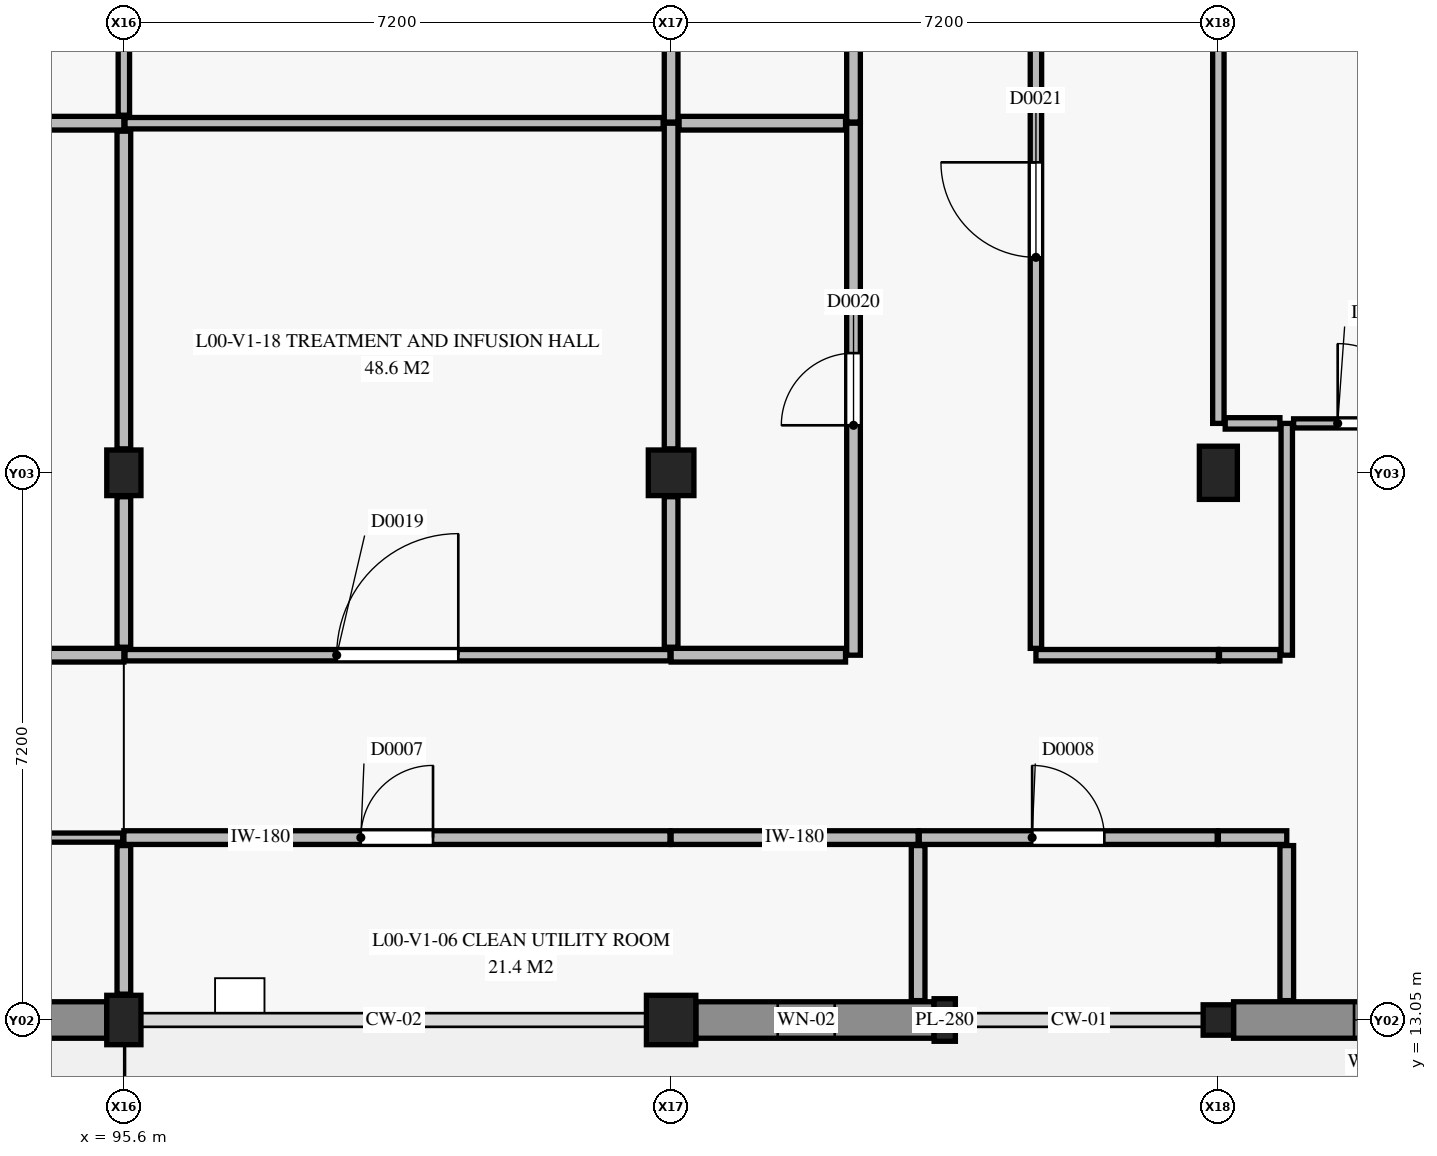
"""IFC4 building model, lengths in metres.
Left out: names, types, materials, properties, quantities, classifications, styles, units other than length and angle.
Written with IfcOpenShell. Run it as: python <this file> out.ifc"""

import sys

from ifc_helpers import new_model, si_unit, direction, frame, frame_2d, origin, origin_2d, place, context, subcontext, project, spatial, rectangle, extrude, element, fill, save


model = new_model("IFC4")
c1 = context("Model", 3, precision=1e-05, world=origin(), true_north=direction((0.0, 1.0)))
c2 = subcontext(c1, "Body", "Model", "MODEL_VIEW")
j1 = project(units=[si_unit("LENGTHUNIT", "METRE"), si_unit("PLANEANGLEUNIT", "RADIAN")], contexts=[c1])
p1 = place(None, origin())
s1 = spatial("IfcSite", under=j1, at=p1, CompositionType="ELEMENT")
p2 = place(p1, origin())
s2 = spatial("IfcBuilding", under=s1, at=p2, CompositionType="ELEMENT")
p3 = place(p2, origin())
s3 = spatial("IfcBuildingStorey", under=s2, at=p3, CompositionType="ELEMENT", Elevation=0.0)
p4 = place(p3, frame((95.6, 13.05, 0.0), z_axis=(0.0, 0.0, 1.0), x_axis=(1.0, 0.0, 0.0)))
e1 = element("IfcColumn", 1, at=p4, inside=s3, PredefinedType="COLUMN", context=c2, shape_type="SweptSolid", body=[
    extrude(rectangle(XDim=0.45, YDim=0.65, at=origin_2d()), origin(), (0.0, 0.0, 1.0), 4.8),
])
p5 = place(p3, frame((95.6, 20.25, 0.0), z_axis=(0.0, 0.0, 1.0), x_axis=(1.0, 0.0, 0.0)))
e2 = element("IfcColumn", 2, at=p5, inside=s3, PredefinedType="COLUMN", context=c2, shape_type="SweptSolid", body=[
    extrude(rectangle(XDim=0.45, YDim=0.6, at=origin_2d()), origin(), (0.0, 0.0, 1.0), 4.8),
])
p6 = place(p3, frame((102.8, 13.05, 0.0), z_axis=(0.0, 0.0, 1.0), x_axis=(1.0, 0.0, 0.0)))
e3 = element("IfcColumn", 3, at=p6, inside=s3, PredefinedType="COLUMN", context=c2, shape_type="SweptSolid", body=[
    extrude(rectangle(XDim=0.65, YDim=0.65, at=origin_2d()), origin(), (0.0, 0.0, 1.0), 4.8),
])
p7 = place(p3, frame((102.8, 20.25, 0.0), z_axis=(0.0, 0.0, 1.0), x_axis=(1.0, 0.0, 0.0)))
e4 = element("IfcColumn", 4, at=p7, inside=s3, PredefinedType="COLUMN", context=c2, shape_type="SweptSolid", body=[
    extrude(rectangle(XDim=0.6, YDim=0.6, at=origin_2d()), origin(), (0.0, 0.0, 1.0), 4.8),
])
p8 = place(p3, frame((110.0, 13.05, 0.0), z_axis=(0.0, 0.0, 1.0), x_axis=(1.0, 0.0, 0.0)))
e5 = element("IfcColumn", 5, at=p8, inside=s3, PredefinedType="COLUMN", context=c2, shape_type="SweptSolid", body=[
    extrude(rectangle(XDim=0.4, YDim=0.4, at=origin_2d()), origin(), (0.0, 0.0, 1.0), 4.8),
])
p9 = place(p3, frame((110.0, 20.25, 0.0), z_axis=(0.0, 0.0, 1.0), x_axis=(1.0, 0.0, 0.0)))
e6 = element("IfcColumn", 6, at=p9, inside=s3, PredefinedType="COLUMN", context=c2, shape_type="SweptSolid", body=[
    extrude(rectangle(XDim=0.5, YDim=0.7, at=origin_2d()), origin(), (0.0, 0.0, 1.0), 4.8),
])
p10 = place(p3, frame((106.4, 13.05, 0.0), z_axis=(0.0, 0.0, 1.0), x_axis=(1.0, 0.0, 0.0)))
e7 = element("IfcColumn", 7, at=p10, inside=s3, PredefinedType="PILASTER", context=c2, shape_type="SweptSolid", body=[
    extrude(rectangle(XDim=0.28, YDim=0.56, at=origin_2d()), origin(), (0.0, 0.0, 1.0), 4.8),
])
p11 = place(p3, frame((113.25, 13.05, 0.0), z_axis=(0.0, 0.0, 1.0), x_axis=(-1.0, 0.0, 0.0)))
e8 = element("IfcWall", 8, at=p11, inside=s3, PredefinedType="SOLIDWALL", context=c2, shape_type="SweptSolid", body=[
    extrude(rectangle(XDim=3.05, YDim=0.48, at=frame_2d((1.525, 0.0))), origin(), (0.0, 0.0, 1.0), 3.73),
])
p12 = place(p11, frame((0.865, 0.0, 0.9)))
e9 = element("IfcOpeningElement", 9, at=p12, cuts=e8, PredefinedType="OPENING", context=c2, shape_type="SweptSolid", body=[
    extrude(rectangle(XDim=0.6, YDim=1.8, at=frame_2d((0.3, 0.9))), frame((0.0, 0.25, 0.0), z_axis=(0.0, -1.0, 0.0), x_axis=(1.0, 0.0, 0.0)), (0.0, 0.0, 1.0), 0.5),
])
p13 = place(p3, frame((106.26, 13.05, 0.0), z_axis=(0.0, 0.0, 1.0), x_axis=(-1.0, 0.0, 0.0)))
e10 = element("IfcWall", 10, at=p13, inside=s3, PredefinedType="SOLIDWALL", context=c2, shape_type="SweptSolid", body=[
    extrude(rectangle(XDim=3.135, YDim=0.48, at=frame_2d((1.567, 0.0))), origin(), (0.0, 0.0, 1.0), 3.73),
])
p14 = place(p13, frame((1.308, 0.0, 0.9)))
e11 = element("IfcOpeningElement", 11, at=p14, cuts=e10, PredefinedType="OPENING", context=c2, shape_type="SweptSolid", body=[
    extrude(rectangle(XDim=0.75, YDim=1.8, at=frame_2d((0.375, 0.9))), frame((0.0, 0.25, 0.0), z_axis=(0.0, -1.0, 0.0), x_axis=(1.0, 0.0, 0.0)), (0.0, 0.0, 1.0), 0.5),
])
p15 = place(p3, frame((95.375, 13.05, 0.0), z_axis=(0.0, 0.0, 1.0), x_axis=(-1.0, 0.0, 0.0)))
e12 = element("IfcWall", 12, at=p15, inside=s3, PredefinedType="SOLIDWALL", context=c2, shape_type="SweptSolid", body=[
    extrude(rectangle(XDim=3.225, YDim=0.48, at=frame_2d((1.613, 0.0))), origin(), (0.0, 0.0, 1.0), 3.73),
])
p16 = place(p15, frame((0.978, 0.0, 0.9)))
e13 = element("IfcOpeningElement", 13, at=p16, cuts=e12, PredefinedType="OPENING", context=c2, shape_type="SweptSolid", body=[
    extrude(rectangle(XDim=0.9, YDim=1.8, at=frame_2d((0.45, 0.9))), frame((0.0, 0.25, 0.0), z_axis=(0.0, -1.0, 0.0), x_axis=(1.0, 0.0, 0.0)), (0.0, 0.0, 1.0), 0.5),
])
p17 = place(p3, frame((102.8, 15.45, 0.0), z_axis=(0.0, 0.0, 1.0), x_axis=(1.0, 0.0, 0.0)))
e14 = element("IfcWall", 14, at=p17, inside=s3, PredefinedType="PLUMBINGWALL", context=c2, shape_type="SweptSolid", body=[
    extrude(rectangle(XDim=3.25, YDim=0.18, at=frame_2d((1.625, 0.0))), origin(), (0.0, 0.0, 1.0), 3.735),
])
p18 = place(p3, frame((95.6, 15.45, 0.0), z_axis=(0.0, 0.0, 1.0), x_axis=(1.0, 0.0, 0.0)))
e15 = element("IfcWall", 15, at=p18, inside=s3, PredefinedType="PLUMBINGWALL", context=c2, shape_type="SweptSolid", body=[
    extrude(rectangle(XDim=7.185, YDim=0.18, at=frame_2d((3.592, 0.0))), origin(), (0.0, 0.0, 1.0), 3.735),
])
p19 = place(p18, frame((3.117, 0.0, 0.0)))
e16 = element("IfcOpeningElement", 16, at=p19, cuts=e15, PredefinedType="OPENING", context=c2, shape_type="SweptSolid", body=[
    extrude(rectangle(XDim=0.95, YDim=2.1, at=frame_2d((0.475, 1.05))), frame((0.0, 0.1, 0.0), z_axis=(0.0, -1.0, 0.0), x_axis=(1.0, 0.0, 0.0)), (0.0, 0.0, 1.0), 0.2),
])
p20 = place(p3, frame((110.0, 15.45, 0.0), z_axis=(0.0, 0.0, 1.0), x_axis=(1.0, 0.0, 0.0)))
e17 = element("IfcWall", 17, at=p20, inside=s3, PredefinedType="PLUMBINGWALL", context=c2, shape_type="SweptSolid", body=[
    extrude(rectangle(XDim=0.9, YDim=0.18, at=frame_2d((0.45, 0.0))), origin(), (0.0, 0.0, 1.0), 3.955),
])
p21 = place(p3, frame((110.9, 13.305, 0.0), z_axis=(0.0, 0.0, 1.0), x_axis=(0.0, 1.0, 0.0)))
e18 = element("IfcWall", 18, at=p21, inside=s3, PredefinedType="PLUMBINGWALL", context=c2, shape_type="SweptSolid", body=[
    extrude(rectangle(XDim=2.04, YDim=0.18, at=frame_2d((1.02, 0.0))), origin(), (0.0, 0.0, 1.0), 4.55),
])
p22 = place(p3, frame((106.065, 15.45, 0.0), z_axis=(0.0, 0.0, 1.0), x_axis=(1.0, 0.0, 0.0)))
e19 = element("IfcWall", 19, at=p22, inside=s3, PredefinedType="PLUMBINGWALL", context=c2, shape_type="SweptSolid", body=[
    extrude(rectangle(XDim=3.92, YDim=0.18, at=frame_2d((1.96, 0.0))), origin(), (0.0, 0.0, 1.0), 3.955),
])
p23 = place(p22, frame((1.485, 0.0, 0.0)))
e20 = element("IfcOpeningElement", 20, at=p23, cuts=e19, PredefinedType="OPENING", context=c2, shape_type="SweptSolid", body=[
    extrude(rectangle(XDim=0.95, YDim=2.1, at=frame_2d((0.475, 1.05))), frame((0.0, 0.1, 0.0), z_axis=(0.0, -1.0, 0.0), x_axis=(1.0, 0.0, 0.0)), (0.0, 0.0, 1.0), 0.2),
])
p24 = place(p3, frame((92.5, 17.85, 0.0), z_axis=(0.0, 0.0, 1.0), x_axis=(1.0, 0.0, 0.0)))
e21 = element("IfcWall", 21, at=p24, inside=s3, PredefinedType="PLUMBINGWALL", context=c2, shape_type="SweptSolid", body=[
    extrude(rectangle(XDim=3.1, YDim=0.18, at=frame_2d((1.55, 0.0))), origin(), (0.0, 0.0, 1.0), 3.985),
])
p25 = place(p24, frame((1.075, 0.0, 0.0)))
e22 = element("IfcOpeningElement", 22, at=p25, cuts=e21, PredefinedType="OPENING", context=c2, shape_type="SweptSolid", body=[
    extrude(rectangle(XDim=0.95, YDim=2.1, at=frame_2d((0.475, 1.05))), frame((0.0, 0.1, 0.0), z_axis=(0.0, -1.0, 0.0), x_axis=(1.0, 0.0, 0.0)), (0.0, 0.0, 1.0), 0.2),
])
p26 = place(p3, frame((105.2, 17.85, 0.0), z_axis=(0.0, 0.0, 1.0), x_axis=(0.0, 1.0, 0.0)))
e23 = element("IfcWall", 23, at=p26, inside=s3, PredefinedType="PLUMBINGWALL", context=c2, shape_type="SweptSolid", body=[
    extrude(rectangle(XDim=7.0, YDim=0.18, at=frame_2d((3.5, 0.0))), origin(), (0.0, 0.0, 1.0), 3.955),
])
p27 = place(p26, frame((3.025, 0.0, 0.0)))
e24 = element("IfcOpeningElement", 24, at=p27, cuts=e23, PredefinedType="OPENING", context=c2, shape_type="SweptSolid", body=[
    extrude(rectangle(XDim=0.95, YDim=2.1, at=frame_2d((0.475, 1.05))), frame((0.0, 0.1, 0.0), z_axis=(0.0, -1.0, 0.0), x_axis=(1.0, 0.0, 0.0)), (0.0, 0.0, 1.0), 0.2),
])
p28 = place(p3, frame((102.8, 17.85, 0.0), z_axis=(0.0, 0.0, 1.0), x_axis=(1.0, 0.0, 0.0)))
e25 = element("IfcWall", 25, at=p28, inside=s3, PredefinedType="PLUMBINGWALL", context=c2, shape_type="SweptSolid", body=[
    extrude(rectangle(XDim=2.295, YDim=0.18, at=frame_2d((1.147, 0.0))), origin(), (0.0, 0.0, 1.0), 3.735),
])
p29 = place(p3, frame((105.2, 24.865, 0.0), z_axis=(0.0, 0.0, 1.0), x_axis=(0.0, 1.0, 0.0)))
e26 = element("IfcWall", 26, at=p29, inside=s3, PredefinedType="PLUMBINGWALL", context=c2, shape_type="SweptSolid", body=[
    extrude(rectangle(XDim=7.58, YDim=0.18, at=frame_2d((3.79, 0.0))), origin(), (0.0, 0.0, 1.0), 3.955),
])
p30 = place(p29, frame((3.315, 0.0, 0.0)))
e27 = element("IfcOpeningElement", 27, at=p30, cuts=e26, PredefinedType="OPENING", context=c2, shape_type="SweptSolid", body=[
    extrude(rectangle(XDim=0.95, YDim=2.1, at=frame_2d((0.475, 1.05))), frame((0.0, 0.1, 0.0), z_axis=(0.0, -1.0, 0.0), x_axis=(1.0, 0.0, 0.0)), (0.0, 0.0, 1.0), 0.2),
])
p31 = place(p3, frame((95.615, 17.85, 0.0), z_axis=(0.0, 0.0, 1.0), x_axis=(1.0, 0.0, 0.0)))
e28 = element("IfcWall", 28, at=p31, inside=s3, PredefinedType="PARTITIONING", context=c2, shape_type="SweptSolid", body=[
    extrude(rectangle(XDim=7.17, YDim=0.15, at=frame_2d((3.585, 0.0))), origin(), (0.0, 0.0, 1.0), 3.735),
])
p32 = place(p31, frame((2.785, 0.0, 0.0)))
e29 = element("IfcOpeningElement", 29, at=p32, cuts=e28, PredefinedType="OPENING", context=c2, shape_type="SweptSolid", body=[
    extrude(rectangle(XDim=1.6, YDim=2.25, at=frame_2d((0.8, 1.125))), frame((0.0, 0.085, 0.0), z_axis=(0.0, -1.0, 0.0), x_axis=(1.0, 0.0, 0.0)), (0.0, 0.0, 1.0), 0.17),
])
p33 = place(p3, frame((107.6, 17.85, 0.0), z_axis=(0.0, 0.0, 1.0), x_axis=(1.0, 0.0, 0.0)))
e30 = element("IfcWall", 30, at=p33, inside=s3, PredefinedType="PARTITIONING", context=c2, shape_type="SweptSolid", body=[
    extrude(rectangle(XDim=2.4, YDim=0.15, at=frame_2d((1.2, 0.0))), origin(), (0.0, 0.0, 1.0), 3.955),
])
p34 = place(p3, frame((107.6, 17.94, 0.0), z_axis=(0.0, 0.0, 1.0), x_axis=(0.0, 1.0, 0.0)))
e31 = element("IfcWall", 31, at=p34, inside=s3, PredefinedType="PARTITIONING", context=c2, shape_type="SweptSolid", body=[
    extrude(rectangle(XDim=11.54, YDim=0.15, at=frame_2d((5.77, 0.0))), origin(), (0.0, 0.0, 1.0), 3.955),
])
p35 = place(p34, frame((5.145, 0.0, 0.0)))
e32 = element("IfcOpeningElement", 32, at=p35, cuts=e31, PredefinedType="OPENING", context=c2, shape_type="SweptSolid", body=[
    extrude(rectangle(XDim=1.25, YDim=2.15, at=frame_2d((0.625, 1.075))), frame((0.0, 0.085, 0.0), z_axis=(0.0, -1.0, 0.0), x_axis=(1.0, 0.0, 0.0)), (0.0, 0.0, 1.0), 0.17),
])
p36 = place(p3, frame((110.9, 17.85, 0.0), z_axis=(0.0, 0.0, 1.0), x_axis=(0.0, 1.0, 0.0)))
e33 = element("IfcWall", 33, at=p36, inside=s3, PredefinedType="PARTITIONING", context=c2, shape_type="SweptSolid", body=[
    extrude(rectangle(XDim=3.05, YDim=0.15, at=frame_2d((1.525, 0.0))), origin(), (0.0, 0.0, 1.0), 4.55),
])
p37 = place(p3, frame((110.015, 17.85, 0.0), z_axis=(0.0, 0.0, 1.0), x_axis=(1.0, 0.0, 0.0)))
e34 = element("IfcWall", 34, at=p37, inside=s3, PredefinedType="PARTITIONING", context=c2, shape_type="SweptSolid", body=[
    extrude(rectangle(XDim=0.795, YDim=0.15, at=frame_2d((0.397, 0.0))), origin(), (0.0, 0.0, 1.0), 3.955),
])
p38 = place(p3, frame((92.5, 15.45, 0.0), z_axis=(0.0, 0.0, 1.0), x_axis=(1.0, 0.0, 0.0)))
e35 = element("IfcWall", 35, at=p38, inside=s3, PredefinedType="PARTITIONING", context=c2, shape_type="SweptSolid", body=[
    extrude(rectangle(XDim=3.085, YDim=0.12, at=frame_2d((1.542, 0.0))), origin(), (0.0, 0.0, 1.0), 3.985),
])
p39 = place(p3, frame((110.99, 20.9, 0.0), z_axis=(0.0, 0.0, 1.0), x_axis=(1.0, 0.0, 0.0)))
e36 = element("IfcWall", 36, at=p39, inside=s3, PredefinedType="PARTITIONING", context=c2, shape_type="SweptSolid", body=[
    extrude(rectangle(XDim=2.21, YDim=0.12, at=frame_2d((1.105, 0.0))), origin(), (0.0, 0.0, 1.0), 4.55),
])
p40 = place(p39, frame((0.58, 0.0, 0.0)))
e37 = element("IfcOpeningElement", 37, at=p40, cuts=e36, PredefinedType="OPENING", context=c2, shape_type="SweptSolid", body=[
    extrude(rectangle(XDim=1.05, YDim=2.15, at=frame_2d((0.525, 1.075))), frame((0.0, 0.07, 0.0), z_axis=(0.0, -1.0, 0.0), x_axis=(1.0, 0.0, 0.0)), (0.0, 0.0, 1.0), 0.14),
])
p41 = place(p3, frame((95.6, 13.39, 0.0), z_axis=(0.0, 0.0, 1.0), x_axis=(0.0, 1.0, 0.0)))
e38 = element("IfcWall", 38, at=p41, inside=s3, PredefinedType="PLUMBINGWALL", context=c2, shape_type="SweptSolid", body=[
    extrude(rectangle(XDim=1.955, YDim=0.18, at=frame_2d((0.978, 0.0))), origin(), (0.0, 0.0, 1.0), 3.985),
])
p42 = place(p3, frame((106.05, 13.305, 0.0), z_axis=(0.0, 0.0, 1.0), x_axis=(0.0, 1.0, 0.0)))
e39 = element("IfcWall", 39, at=p42, inside=s3, PredefinedType="PLUMBINGWALL", context=c2, shape_type="SweptSolid", body=[
    extrude(rectangle(XDim=2.04, YDim=0.18, at=frame_2d((1.02, 0.0))), origin(), (0.0, 0.0, 1.0), 4.55),
])
p43 = place(p3, frame((92.605, 24.85, 0.0), z_axis=(0.0, 0.0, 1.0), x_axis=(1.0, 0.0, 0.0)))
e40 = element("IfcWall", 40, at=p43, inside=s3, PredefinedType="PLUMBINGWALL", context=c2, shape_type="SweptSolid", body=[
    extrude(rectangle(XDim=2.995, YDim=0.18, at=frame_2d((1.498, 0.0))), origin(), (0.0, 0.0, 1.0), 4.55),
])
p44 = place(p3, frame((95.6, 17.955, 0.0), z_axis=(0.0, 0.0, 1.0), x_axis=(0.0, 1.0, 0.0)))
e41 = element("IfcWall", 41, at=p44, inside=s3, PredefinedType="PLUMBINGWALL", context=c2, shape_type="SweptSolid", body=[
    extrude(rectangle(XDim=1.98, YDim=0.18, at=frame_2d((0.99, 0.0))), origin(), (0.0, 0.0, 1.0), 3.985),
])
p45 = place(p3, frame((95.6, 20.565, 0.0), z_axis=(0.0, 0.0, 1.0), x_axis=(0.0, 1.0, 0.0)))
e42 = element("IfcWall", 42, at=p45, inside=s3, PredefinedType="PLUMBINGWALL", context=c2, shape_type="SweptSolid", body=[
    extrude(rectangle(XDim=4.18, YDim=0.18, at=frame_2d((2.09, 0.0))), origin(), (0.0, 0.0, 1.0), 4.55),
])
p46 = place(p3, frame((102.8, 17.955, 0.0), z_axis=(0.0, 0.0, 1.0), x_axis=(0.0, 1.0, 0.0)))
e43 = element("IfcWall", 43, at=p46, inside=s3, PredefinedType="PLUMBINGWALL", context=c2, shape_type="SweptSolid", body=[
    extrude(rectangle(XDim=1.98, YDim=0.18, at=frame_2d((0.99, 0.0))), origin(), (0.0, 0.0, 1.0), 3.735),
])
p47 = place(p3, frame((102.8, 20.565, 0.0), z_axis=(0.0, 0.0, 1.0), x_axis=(0.0, 1.0, 0.0)))
e44 = element("IfcWall", 44, at=p47, inside=s3, PredefinedType="PLUMBINGWALL", context=c2, shape_type="SweptSolid", body=[
    extrude(rectangle(XDim=4.285, YDim=0.18, at=frame_2d((2.143, 0.0))), origin(), (0.0, 0.0, 1.0), 3.835),
])
p48 = place(p3, frame((102.905, 24.85, 0.0), z_axis=(0.0, 0.0, 1.0), x_axis=(1.0, 0.0, 0.0)))
e45 = element("IfcWall", 45, at=p48, inside=s3, PredefinedType="PLUMBINGWALL", context=c2, shape_type="SweptSolid", body=[
    extrude(rectangle(XDim=2.19, YDim=0.18, at=frame_2d((1.095, 0.0))), origin(), (0.0, 0.0, 1.0), 3.835),
])
p49 = place(p3, frame((102.8, 24.865, 0.0), z_axis=(0.0, 0.0, 1.0), x_axis=(0.0, 1.0, 0.0)))
e46 = element("IfcWall", 46, at=p49, inside=s3, PredefinedType="PLUMBINGWALL", context=c2, shape_type="SweptSolid", body=[
    extrude(rectangle(XDim=2.295, YDim=0.18, at=frame_2d((1.147, 0.0))), origin(), (0.0, 0.0, 1.0), 3.835),
])
p50 = place(p3, frame((95.615, 24.85, 0.0), z_axis=(0.0, 0.0, 1.0), x_axis=(1.0, 0.0, 0.0)))
e47 = element("IfcWall", 47, at=p50, inside=s3, PredefinedType="PARTITIONING", context=c2, shape_type="SweptSolid", body=[
    extrude(rectangle(XDim=7.08, YDim=0.15, at=frame_2d((3.54, 0.0))), origin(), (0.0, 0.0, 1.0), 3.835),
])
p51 = place(p3, frame((110.0, 20.9, 0.0), z_axis=(0.0, 0.0, 1.0), x_axis=(0.0, 1.0, 0.0)))
e48 = element("IfcWall", 48, at=p51, inside=s3, PredefinedType="PARTITIONING", context=c2, shape_type="SweptSolid", body=[
    extrude(rectangle(XDim=6.21, YDim=0.15, at=frame_2d((3.105, 0.0))), origin(), (0.0, 0.0, 1.0), 3.955),
])
p52 = place(p3, frame((110.09, 20.9, 0.0), z_axis=(0.0, 0.0, 1.0), x_axis=(1.0, 0.0, 0.0)))
e49 = element("IfcWall", 49, at=p52, inside=s3, PredefinedType="PARTITIONING", context=c2, shape_type="SweptSolid", body=[
    extrude(rectangle(XDim=0.72, YDim=0.15, at=frame_2d((0.36, 0.0))), origin(), (0.0, 0.0, 1.0), 3.955),
])
p53 = place(p3, frame((95.6, 24.955, 0.0), z_axis=(0.0, 0.0, 1.0), x_axis=(0.0, 1.0, 0.0)))
e50 = element("IfcWall", 50, at=p53, inside=s3, PredefinedType="PARTITIONING", context=c2, shape_type="SweptSolid", body=[
    extrude(rectangle(XDim=2.205, YDim=0.15, at=frame_2d((1.103, 0.0))), origin(), (0.0, 0.0, 1.0), 4.55),
])
p54 = place(p12, origin())
e51 = element("IfcWindow", 51, at=p54, inside=s3, PartitioningType="SINGLE_PANEL", PredefinedType="WINDOW", context=c2, shape_type="SweptSolid", body=[
    extrude(rectangle(XDim=0.6, YDim=1.8, at=frame_2d((0.3, 0.9))), frame((0.0, 0.03, 0.0), z_axis=(0.0, -1.0, 0.0), x_axis=(1.0, 0.0, 0.0)), (0.0, 0.0, 1.0), 0.06),
])
fill(e9, e51)
p55 = place(p14, origin())
e52 = element("IfcWindow", 52, at=p55, inside=s3, PartitioningType="SINGLE_PANEL", PredefinedType="WINDOW", context=c2, shape_type="SweptSolid", body=[
    extrude(rectangle(XDim=0.75, YDim=1.8, at=frame_2d((0.375, 0.9))), frame((0.0, 0.03, 0.0), z_axis=(0.0, -1.0, 0.0), x_axis=(1.0, 0.0, 0.0)), (0.0, 0.0, 1.0), 0.06),
])
fill(e11, e52)
p56 = place(p19, origin())
e53 = element("IfcDoor", 53, at=p56, inside=s3, OperationType="SINGLE_SWING_RIGHT", PredefinedType="DOOR", context=c2, shape_type="SweptSolid", body=[
    extrude(rectangle(XDim=0.95, YDim=2.1, at=frame_2d((0.475, 1.05))), frame((0.0, 0.025, 0.0), z_axis=(0.0, -1.0, 0.0), x_axis=(1.0, 0.0, 0.0)), (0.0, 0.0, 1.0), 0.05),
])
fill(e16, e53)
p57 = place(p23, origin())
e54 = element("IfcDoor", 54, at=p57, inside=s3, OperationType="SINGLE_SWING_LEFT", PredefinedType="DOOR", context=c2, shape_type="SweptSolid", body=[
    extrude(rectangle(XDim=0.95, YDim=2.1, at=frame_2d((0.475, 1.05))), frame((0.0, 0.025, 0.0), z_axis=(0.0, -1.0, 0.0), x_axis=(1.0, 0.0, 0.0)), (0.0, 0.0, 1.0), 0.05),
])
fill(e20, e54)
p58 = place(p32, origin())
e55 = element("IfcDoor", 55, at=p58, inside=s3, OperationType="SINGLE_SWING_RIGHT", PredefinedType="DOOR", context=c2, shape_type="SweptSolid", body=[
    extrude(rectangle(XDim=1.6, YDim=2.25, at=frame_2d((0.8, 1.125))), frame((0.0, 0.025, 0.0), z_axis=(0.0, -1.0, 0.0), x_axis=(1.0, 0.0, 0.0)), (0.0, 0.0, 1.0), 0.05),
])
fill(e29, e55)
p59 = place(p27, origin())
e56 = element("IfcDoor", 56, at=p59, inside=s3, OperationType="SINGLE_SWING_LEFT", PredefinedType="DOOR", context=c2, shape_type="SweptSolid", body=[
    extrude(rectangle(XDim=0.95, YDim=2.1, at=frame_2d((0.475, 1.05))), frame((0.0, 0.025, 0.0), z_axis=(0.0, -1.0, 0.0), x_axis=(1.0, 0.0, 0.0)), (0.0, 0.0, 1.0), 0.05),
])
fill(e24, e56)
p60 = place(p35, origin())
e57 = element("IfcDoor", 57, at=p60, inside=s3, OperationType="SINGLE_SWING_RIGHT", PredefinedType="DOOR", context=c2, shape_type="SweptSolid", body=[
    extrude(rectangle(XDim=1.25, YDim=2.15, at=frame_2d((0.625, 1.075))), frame((0.0, 0.025, 0.0), z_axis=(0.0, -1.0, 0.0), x_axis=(1.0, 0.0, 0.0)), (0.0, 0.0, 1.0), 0.05),
])
fill(e32, e57)
p61 = place(p40, origin())
e58 = element("IfcDoor", 58, at=p61, inside=s3, OperationType="SINGLE_SWING_LEFT", PredefinedType="DOOR", context=c2, shape_type="SweptSolid", body=[
    extrude(rectangle(XDim=1.05, YDim=2.15, at=frame_2d((0.525, 1.075))), frame((0.0, 0.025, 0.0), z_axis=(0.0, -1.0, 0.0), x_axis=(1.0, 0.0, 0.0)), (0.0, 0.0, 1.0), 0.05),
])
fill(e37, e58)
save(model, sys.argv[1])
